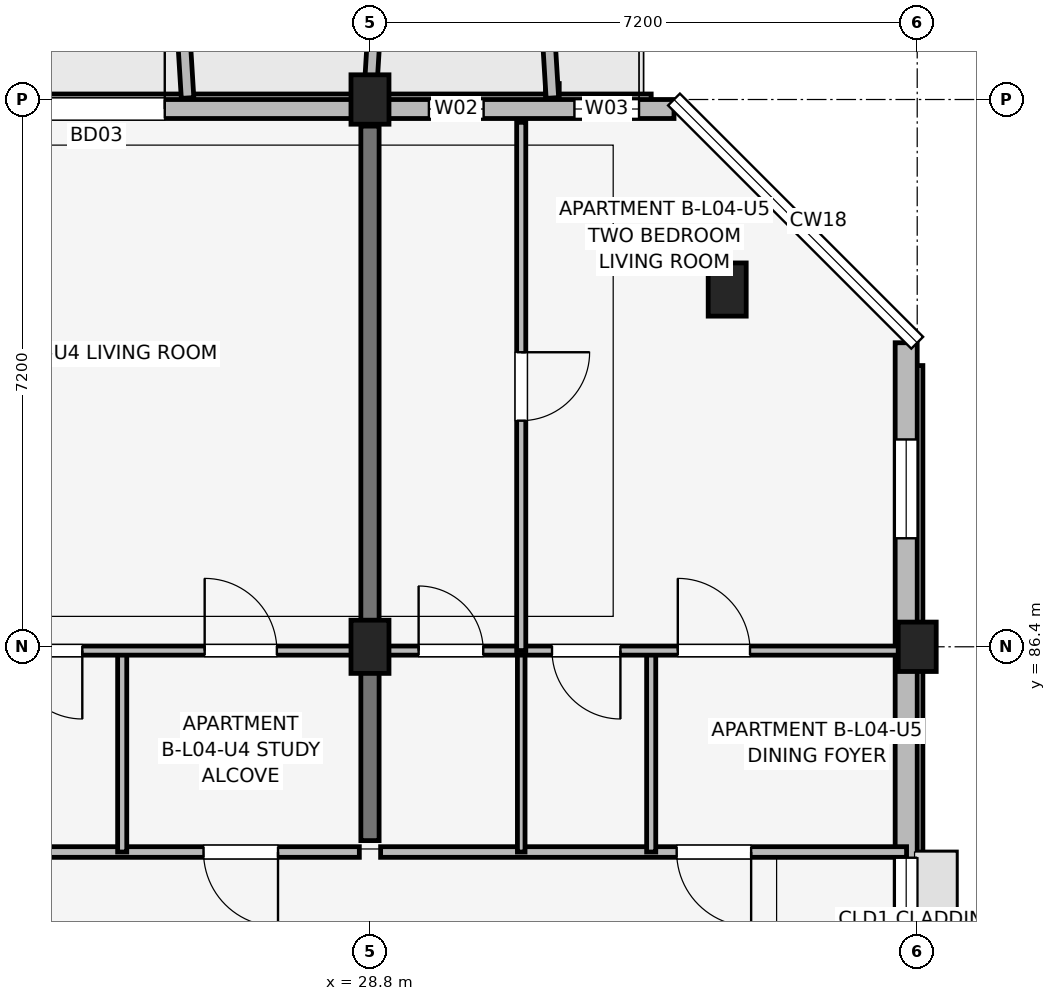
"""IFC4 building model, lengths in metres.
Left out: names, types, materials, properties, quantities, classifications, styles, units other than length and angle.
Written with IfcOpenShell. Run it as: python <this file> out.ifc"""

import sys

from ifc_helpers import new_model, si_unit, direction, frame, frame_2d, origin, origin_2d, place, context, subcontext, project, spatial, rectangle, extrude, element, fill, save


model = new_model("IFC4")
c1 = context("Model", 3, precision=1e-05, world=origin(), true_north=direction((0.0, 1.0)))
c2 = subcontext(c1, "Body", "Model", "MODEL_VIEW")
j1 = project(units=[si_unit("LENGTHUNIT", "METRE"), si_unit("PLANEANGLEUNIT", "RADIAN")], contexts=[c1])
p1 = place(None, origin())
s1 = spatial("IfcSite", under=j1, at=p1, CompositionType="ELEMENT")
p2 = place(p1, origin())
s2 = spatial("IfcBuilding", under=s1, at=p2, CompositionType="ELEMENT")
p3 = place(p2, frame((0.0, 0.0, 15.0)))
s3 = spatial("IfcBuildingStorey", under=s2, at=p3, CompositionType="ELEMENT", Elevation=15.0)
p4 = place(p3, frame((28.8, 86.4, 0.0), z_axis=(0.0, 0.0, 1.0), x_axis=(1.0, 0.0, 0.0)))
e1 = element("IfcColumn", 1, at=p4, inside=s3, PredefinedType="COLUMN", context=c2, shape_type="SweptSolid", body=[
    extrude(rectangle(XDim=0.5, YDim=0.7, at=origin_2d()), origin(), (0.0, 0.0, 1.0), 3.15),
])
for number, where, z_axis, x_axis in (
    (2, (28.8, 93.6, 0.0), (0.0, 0.0, 1.0), (1.0, 0.0, 0.0)),
    (3, (36.0, 86.4, 0.0), (0.0, 0.0, 1.0), (1.0, 0.0, 0.0)),
):
    element("IfcColumn", number, at=place(p3, frame(where, z_axis=z_axis, x_axis=x_axis)), inside=s3, PredefinedType="COLUMN", context=c2, shape_type="SweptSolid", body=[
        extrude(rectangle(XDim=0.5, YDim=0.65, at=origin_2d()), origin(), (0.0, 0.0, 1.0), 3.15),
    ])
p5 = place(p3, frame((33.5, 91.1, 0.0), z_axis=(0.0, 0.0, 1.0), x_axis=(1.0, 0.0, 0.0)))
e4 = element("IfcColumn", 4, at=p5, inside=s3, PredefinedType="COLUMN", context=c2, shape_type="SweptSolid", body=[
    extrude(rectangle(XDim=0.5, YDim=0.7, at=origin_2d()), origin(), (0.0, 0.0, 1.0), 3.15),
])
p6 = place(p3, frame((28.8, 83.85, 0.0), z_axis=(0.0, 0.0, 1.0), x_axis=(0.0, 1.0, 0.0)))
e5 = element("IfcWall", 5, at=p6, inside=s3, PredefinedType="SHEAR", context=c2, shape_type="SweptSolid", body=[
    extrude(rectangle(XDim=9.4, YDim=0.24, at=frame_2d((4.7, 0.0))), origin(), (0.0, 0.0, 1.0), 3.15),
])
p7 = place(p3, frame((35.855, 75.2, 0.0), z_axis=(0.0, 0.0, 1.0), x_axis=(0.0, 1.0, 0.0)))
e6 = element("IfcWall", 6, at=p7, inside=s3, PredefinedType="SOLIDWALL", context=c2, shape_type="SweptSolid", body=[
    extrude(rectangle(XDim=15.2, YDim=0.29, at=frame_2d((7.6, 0.0))), origin(), (0.0, 0.0, 1.0), 2.38),
])
p8 = place(p7, frame((6.775, 0.0, 1.05)))
e7 = element("IfcOpeningElement", 7, at=p8, cuts=e6, PredefinedType="OPENING", context=c2, shape_type="SweptSolid", body=[
    extrude(rectangle(XDim=1.65, YDim=1.15, at=frame_2d((0.825, 0.575))), frame((0.0, 0.155, 0.0), z_axis=(0.0, -1.0, 0.0), x_axis=(1.0, 0.0, 0.0)), (0.0, 0.0, 1.0), 0.31),
])
p9 = place(p7, frame((12.627, 0.0, 0.72)))
e8 = element("IfcOpeningElement", 8, at=p9, cuts=e6, PredefinedType="OPENING", context=c2, shape_type="SweptSolid", body=[
    extrude(rectangle(XDim=1.3, YDim=1.55, at=frame_2d((0.65, 0.775))), frame((0.0, 0.155, 0.0), z_axis=(0.0, -1.0, 0.0), x_axis=(1.0, 0.0, 0.0)), (0.0, 0.0, 1.0), 0.31),
])
p10 = place(p3, frame((32.8, 93.475, 0.0), z_axis=(0.0, 0.0, 1.0), x_axis=(-1.0, 0.0, 0.0)))
e9 = element("IfcWall", 9, at=p10, inside=s3, PredefinedType="SOLIDWALL", context=c2, shape_type="SweptSolid", body=[
    extrude(rectangle(XDim=29.6, YDim=0.25, at=frame_2d((14.8, 0.0))), origin(), (0.0, 0.0, 1.0), 2.43),
])
p11 = place(p10, frame((22.75, 0.0, 0.0), z_axis=(0.0, 0.0, 1.0), x_axis=(-1.0, 0.0, 0.0)))
e10 = element("IfcOpeningElement", 10, at=p11, cuts=e9, PredefinedType="OPENING", context=c2, shape_type="SweptSolid", body=[
    extrude(rectangle(XDim=1.5, YDim=2.15, at=frame_2d((0.75, 1.075))), frame((0.0, 0.135, 0.0), z_axis=(0.0, -1.0, 0.0), x_axis=(1.0, 0.0, 0.0)), (0.0, 0.0, 1.0), 0.27),
])
p12 = place(p10, frame((8.5, 0.0, 0.0), z_axis=(0.0, 0.0, 1.0), x_axis=(-1.0, 0.0, 0.0)))
e11 = element("IfcOpeningElement", 11, at=p12, cuts=e9, PredefinedType="OPENING", context=c2, shape_type="SweptSolid", body=[
    extrude(rectangle(XDim=1.8, YDim=2.15, at=frame_2d((0.9, 1.075))), frame((0.0, 0.135, 0.0), z_axis=(0.0, -1.0, 0.0), x_axis=(1.0, 0.0, 0.0)), (0.0, 0.0, 1.0), 0.27),
])
p13 = place(p10, frame((26.015, 0.0, 0.7)))
e12 = element("IfcOpeningElement", 12, at=p13, cuts=e9, PredefinedType="OPENING", context=c2, shape_type="SweptSolid", body=[
    extrude(rectangle(XDim=1.86, YDim=1.6, at=frame_2d((0.93, 0.8))), frame((0.0, 0.135, 0.0), z_axis=(0.0, -1.0, 0.0), x_axis=(1.0, 0.0, 0.0)), (0.0, 0.0, 1.0), 0.27),
])
p14 = place(p10, frame((23.61, 0.0, 0.75)))
e13 = element("IfcOpeningElement", 13, at=p14, cuts=e9, PredefinedType="OPENING", context=c2, shape_type="SweptSolid", body=[
    extrude(rectangle(XDim=1.46, YDim=1.55, at=frame_2d((0.73, 0.775))), frame((0.0, 0.135, 0.0), z_axis=(0.0, -1.0, 0.0), x_axis=(1.0, 0.0, 0.0)), (0.0, 0.0, 1.0), 0.27),
])
p15 = place(p10, frame((13.94, 0.0, 0.7)))
e14 = element("IfcOpeningElement", 14, at=p15, cuts=e9, PredefinedType="OPENING", context=c2, shape_type="SweptSolid", body=[
    extrude(rectangle(XDim=1.72, YDim=1.6, at=frame_2d((0.86, 0.8))), frame((0.0, 0.135, 0.0), z_axis=(0.0, -1.0, 0.0), x_axis=(1.0, 0.0, 0.0)), (0.0, 0.0, 1.0), 0.27),
])
p16 = place(p10, frame((2.505, 0.0, 0.75)))
e15 = element("IfcOpeningElement", 15, at=p16, cuts=e9, PredefinedType="OPENING", context=c2, shape_type="SweptSolid", body=[
    extrude(rectangle(XDim=0.72, YDim=1.35, at=frame_2d((0.36, 0.675))), frame((0.0, 0.135, 0.0), z_axis=(0.0, -1.0, 0.0), x_axis=(1.0, 0.0, 0.0)), (0.0, 0.0, 1.0), 0.27),
])
p17 = place(p10, frame((0.46, 0.0, 0.75)))
e16 = element("IfcOpeningElement", 16, at=p17, cuts=e9, PredefinedType="OPENING", context=c2, shape_type="SweptSolid", body=[
    extrude(rectangle(XDim=0.85, YDim=1.4, at=frame_2d((0.425, 0.7))), frame((0.0, 0.135, 0.0), z_axis=(0.0, -1.0, 0.0), x_axis=(1.0, 0.0, 0.0)), (0.0, 0.0, 1.0), 0.27),
])
p18 = place(p3, frame((26.4, 93.62, 0.0), z_axis=(0.0, 0.0, 1.0), x_axis=(-0.061046865508, 0.998134900808, 0.0)))
e17 = element("IfcWall", 17, at=p18, inside=s3, PredefinedType="ELEMENTEDWALL", context=c2, shape_type="SweptSolid", body=[
    extrude(rectangle(XDim=1.964, YDim=0.165, at=frame_2d((0.982, 0.0))), origin(), (0.0, 0.0, 1.0), 2.48),
])
for number, where, z_axis, x_axis in (
    (18, (28.8, 93.62, 0.0), (0.0, 0.0, 1.0), (0.061, 0.998, 0.0)),
    (19, (31.2, 93.62, 0.0), (0.0, 0.0, 1.0), (-0.061, 0.998, 0.0)),
):
    element("IfcWall", number, at=place(p3, frame(where, z_axis=z_axis, x_axis=x_axis)), inside=s3, PredefinedType="ELEMENTEDWALL", context=c2, shape_type="SweptSolid", body=[
        extrude(rectangle(XDim=1.964, YDim=0.165, at=frame_2d((0.982, 0.0))), origin(), (0.0, 0.0, 1.0), 2.95),
    ])
p19 = place(p3, frame((21.74, 83.7, 0.0), z_axis=(0.0, 0.0, 1.0), x_axis=(1.0, 0.0, 0.0)))
e20 = element("IfcWall", 20, at=p19, inside=s3, PredefinedType="PARTITIONING", context=c2, shape_type="SweptSolid", body=[
    extrude(rectangle(XDim=6.92, YDim=0.14, at=frame_2d((3.46, 0.0))), origin(), (0.0, 0.0, 1.0), 2.38),
])
p20 = place(p19, frame((5.85, 0.0, 0.0), z_axis=(0.0, 0.0, 1.0), x_axis=(-1.0, 0.0, 0.0)))
e21 = element("IfcOpeningElement", 21, at=p20, cuts=e20, PredefinedType="OPENING", context=c2, shape_type="SweptSolid", body=[
    extrude(rectangle(XDim=0.98, YDim=2.1, at=frame_2d((0.49, 1.05))), frame((0.0, 0.08, 0.0), z_axis=(0.0, -1.0, 0.0), x_axis=(1.0, 0.0, 0.0)), (0.0, 0.0, 1.0), 0.16),
])
p21 = place(p3, frame((25.54, 83.7, 0.0), z_axis=(0.0, 0.0, 1.0), x_axis=(0.0, 1.0, 0.0)))
e22 = element("IfcWall", 22, at=p21, inside=s3, PredefinedType="PARTITIONING", context=c2, shape_type="SweptSolid", body=[
    extrude(rectangle(XDim=2.65, YDim=0.12, at=frame_2d((1.325, 0.0))), origin(), (0.0, 0.0, 1.0), 2.375),
])
p22 = place(p3, frame((21.74, 86.35, 0.0), z_axis=(0.0, 0.0, 1.0), x_axis=(1.0, 0.0, 0.0)))
e23 = element("IfcWall", 23, at=p22, inside=s3, PredefinedType="PARTITIONING", context=c2, shape_type="SweptSolid", body=[
    extrude(rectangle(XDim=6.92, YDim=0.12, at=frame_2d((3.46, 0.0))), origin(), (0.0, 0.0, 1.0), 2.375),
])
p23 = place(p22, frame((0.5, 0.0, 0.0)))
e24 = element("IfcOpeningElement", 24, at=p23, cuts=e23, PredefinedType="OPENING", context=c2, shape_type="SweptSolid", body=[
    extrude(rectangle(XDim=0.85, YDim=2.08, at=frame_2d((0.425, 1.04))), frame((0.0, 0.07, 0.0), z_axis=(0.0, -1.0, 0.0), x_axis=(1.0, 0.0, 0.0)), (0.0, 0.0, 1.0), 0.14),
])
p24 = place(p22, frame((3.275, 0.0, 0.0), z_axis=(0.0, 0.0, 1.0), x_axis=(-1.0, 0.0, 0.0)))
e25 = element("IfcOpeningElement", 25, at=p24, cuts=e23, PredefinedType="OPENING", context=c2, shape_type="SweptSolid", body=[
    extrude(rectangle(XDim=0.9, YDim=2.08, at=frame_2d((0.45, 1.04))), frame((0.0, 0.07, 0.0), z_axis=(0.0, -1.0, 0.0), x_axis=(1.0, 0.0, 0.0)), (0.0, 0.0, 1.0), 0.14),
])
p25 = place(p22, frame((4.885, 0.0, 0.0)))
e26 = element("IfcOpeningElement", 26, at=p25, cuts=e23, PredefinedType="OPENING", context=c2, shape_type="SweptSolid", body=[
    extrude(rectangle(XDim=0.95, YDim=2.08, at=frame_2d((0.475, 1.04))), frame((0.0, 0.07, 0.0), z_axis=(0.0, -1.0, 0.0), x_axis=(1.0, 0.0, 0.0)), (0.0, 0.0, 1.0), 0.14),
])
p26 = place(p3, frame((28.94, 83.7, 0.0), z_axis=(0.0, 0.0, 1.0), x_axis=(1.0, 0.0, 0.0)))
e27 = element("IfcWall", 27, at=p26, inside=s3, PredefinedType="PARTITIONING", context=c2, shape_type="SweptSolid", body=[
    extrude(rectangle(XDim=6.92, YDim=0.14, at=frame_2d((3.46, 0.0))), origin(), (0.0, 0.0, 1.0), 2.38),
])
p27 = place(p26, frame((4.875, 0.0, 0.0), z_axis=(0.0, 0.0, 1.0), x_axis=(-1.0, 0.0, 0.0)))
e28 = element("IfcOpeningElement", 28, at=p27, cuts=e27, PredefinedType="OPENING", context=c2, shape_type="SweptSolid", body=[
    extrude(rectangle(XDim=0.98, YDim=2.1, at=frame_2d((0.49, 1.05))), frame((0.0, 0.08, 0.0), z_axis=(0.0, -1.0, 0.0), x_axis=(1.0, 0.0, 0.0)), (0.0, 0.0, 1.0), 0.16),
])
p28 = place(p3, frame((30.79, 83.7, 0.0), z_axis=(0.0, 0.0, 1.0), x_axis=(0.0, 1.0, 0.0)))
e29 = element("IfcWall", 29, at=p28, inside=s3, PredefinedType="PARTITIONING", context=c2, shape_type="SweptSolid", body=[
    extrude(rectangle(XDim=2.65, YDim=0.1, at=frame_2d((1.325, 0.0))), origin(), (0.0, 0.0, 1.0), 2.375),
])
p29 = place(p3, frame((32.5, 83.7, 0.0), z_axis=(0.0, 0.0, 1.0), x_axis=(0.0, 1.0, 0.0)))
e30 = element("IfcWall", 30, at=p29, inside=s3, PredefinedType="PARTITIONING", context=c2, shape_type="SweptSolid", body=[
    extrude(rectangle(XDim=2.65, YDim=0.12, at=frame_2d((1.325, 0.0))), origin(), (0.0, 0.0, 1.0), 2.375),
])
p30 = place(p3, frame((28.94, 86.35, 0.0), z_axis=(0.0, 0.0, 1.0), x_axis=(1.0, 0.0, 0.0)))
e31 = element("IfcWall", 31, at=p30, inside=s3, PredefinedType="PARTITIONING", context=c2, shape_type="SweptSolid", body=[
    extrude(rectangle(XDim=6.92, YDim=0.12, at=frame_2d((3.46, 0.0))), origin(), (0.0, 0.0, 1.0), 2.375),
])
p31 = place(p30, frame((0.5, 0.0, 0.0)))
e32 = element("IfcOpeningElement", 32, at=p31, cuts=e31, PredefinedType="OPENING", context=c2, shape_type="SweptSolid", body=[
    extrude(rectangle(XDim=0.85, YDim=2.08, at=frame_2d((0.425, 1.04))), frame((0.0, 0.07, 0.0), z_axis=(0.0, -1.0, 0.0), x_axis=(1.0, 0.0, 0.0)), (0.0, 0.0, 1.0), 0.14),
])
p32 = place(p30, frame((3.155, 0.0, 0.0), z_axis=(0.0, 0.0, 1.0), x_axis=(-1.0, 0.0, 0.0)))
e33 = element("IfcOpeningElement", 33, at=p32, cuts=e31, PredefinedType="OPENING", context=c2, shape_type="SweptSolid", body=[
    extrude(rectangle(XDim=0.9, YDim=2.08, at=frame_2d((0.45, 1.04))), frame((0.0, 0.07, 0.0), z_axis=(0.0, -1.0, 0.0), x_axis=(1.0, 0.0, 0.0)), (0.0, 0.0, 1.0), 0.14),
])
p33 = place(p30, frame((3.91, 0.0, 0.0)))
e34 = element("IfcOpeningElement", 34, at=p33, cuts=e31, PredefinedType="OPENING", context=c2, shape_type="SweptSolid", body=[
    extrude(rectangle(XDim=0.95, YDim=2.08, at=frame_2d((0.475, 1.04))), frame((0.0, 0.07, 0.0), z_axis=(0.0, -1.0, 0.0), x_axis=(1.0, 0.0, 0.0)), (0.0, 0.0, 1.0), 0.14),
])
p34 = place(p3, frame((30.79, 86.35, 0.0), z_axis=(0.0, 0.0, 1.0), x_axis=(0.0, 1.0, 0.0)))
e35 = element("IfcWall", 35, at=p34, inside=s3, PredefinedType="PARTITIONING", context=c2, shape_type="SweptSolid", body=[
    extrude(rectangle(XDim=6.95, YDim=0.12, at=frame_2d((3.475, 0.0))), origin(), (0.0, 0.0, 1.0), 2.375),
])
p35 = place(p34, frame((3.925, 0.0, 0.0), z_axis=(0.0, 0.0, 1.0), x_axis=(-1.0, 0.0, 0.0)))
e36 = element("IfcOpeningElement", 36, at=p35, cuts=e35, PredefinedType="OPENING", context=c2, shape_type="SweptSolid", body=[
    extrude(rectangle(XDim=0.9, YDim=2.08, at=frame_2d((0.45, 1.04))), frame((0.0, 0.07, 0.0), z_axis=(0.0, -1.0, 0.0), x_axis=(1.0, 0.0, 0.0)), (0.0, 0.0, 1.0), 0.14),
])
p36 = place(p12, origin())
e37 = element("IfcDoor", 37, at=p36, inside=s3, OperationType="SINGLE_SWING_LEFT", PredefinedType="DOOR", context=c2, shape_type="SweptSolid", body=[
    extrude(rectangle(XDim=1.8, YDim=2.15, at=frame_2d((0.9, 1.075))), frame((0.0, 0.025, 0.0), z_axis=(0.0, -1.0, 0.0), x_axis=(1.0, 0.0, 0.0)), (0.0, 0.0, 1.0), 0.05),
])
fill(e11, e37)
p37 = place(p16, origin())
e38 = element("IfcWindow", 38, at=p37, inside=s3, PartitioningType="SINGLE_PANEL", PredefinedType="WINDOW", context=c2, shape_type="SweptSolid", body=[
    extrude(rectangle(XDim=0.72, YDim=1.35, at=frame_2d((0.36, 0.675))), frame((0.0, 0.03, 0.0), z_axis=(0.0, -1.0, 0.0), x_axis=(1.0, 0.0, 0.0)), (0.0, 0.0, 1.0), 0.06),
])
fill(e15, e38)
p38 = place(p17, origin())
e39 = element("IfcWindow", 39, at=p38, inside=s3, PartitioningType="SINGLE_PANEL", PredefinedType="WINDOW", context=c2, shape_type="SweptSolid", body=[
    extrude(rectangle(XDim=0.85, YDim=1.4, at=frame_2d((0.425, 0.7))), frame((0.0, 0.03, 0.0), z_axis=(0.0, -1.0, 0.0), x_axis=(1.0, 0.0, 0.0)), (0.0, 0.0, 1.0), 0.06),
])
fill(e16, e39)
p39 = place(p8, origin())
e40 = element("IfcWindow", 40, at=p39, inside=s3, PartitioningType="SINGLE_PANEL", PredefinedType="WINDOW", context=c2, shape_type="SweptSolid", body=[
    extrude(rectangle(XDim=1.65, YDim=1.15, at=frame_2d((0.825, 0.575))), frame((0.0, 0.03, 0.0), z_axis=(0.0, -1.0, 0.0), x_axis=(1.0, 0.0, 0.0)), (0.0, 0.0, 1.0), 0.06),
])
fill(e7, e40)
p40 = place(p9, origin())
e41 = element("IfcWindow", 41, at=p40, inside=s3, PartitioningType="SINGLE_PANEL", PredefinedType="WINDOW", context=c2, shape_type="SweptSolid", body=[
    extrude(rectangle(XDim=1.3, YDim=1.55, at=frame_2d((0.65, 0.775))), frame((0.0, 0.03, 0.0), z_axis=(0.0, -1.0, 0.0), x_axis=(1.0, 0.0, 0.0)), (0.0, 0.0, 1.0), 0.06),
])
fill(e8, e41)
p41 = place(p20, origin())
e42 = element("IfcDoor", 42, at=p41, inside=s3, OperationType="SINGLE_SWING_RIGHT", PredefinedType="DOOR", context=c2, shape_type="SweptSolid", body=[
    extrude(rectangle(XDim=0.98, YDim=2.1, at=frame_2d((0.49, 1.05))), frame((0.0, 0.025, 0.0), z_axis=(0.0, -1.0, 0.0), x_axis=(1.0, 0.0, 0.0)), (0.0, 0.0, 1.0), 0.05),
])
fill(e21, e42)
p42 = place(p24, origin())
e43 = element("IfcDoor", 43, at=p42, inside=s3, OperationType="SINGLE_SWING_RIGHT", PredefinedType="DOOR", context=c2, shape_type="SweptSolid", body=[
    extrude(rectangle(XDim=0.9, YDim=2.08, at=frame_2d((0.45, 1.04))), frame((0.0, 0.025, 0.0), z_axis=(0.0, -1.0, 0.0), x_axis=(1.0, 0.0, 0.0)), (0.0, 0.0, 1.0), 0.05),
])
fill(e25, e43)
p43 = place(p25, origin())
e44 = element("IfcDoor", 44, at=p43, inside=s3, OperationType="SINGLE_SWING_LEFT", PredefinedType="DOOR", context=c2, shape_type="SweptSolid", body=[
    extrude(rectangle(XDim=0.95, YDim=2.08, at=frame_2d((0.475, 1.04))), frame((0.0, 0.025, 0.0), z_axis=(0.0, -1.0, 0.0), x_axis=(1.0, 0.0, 0.0)), (0.0, 0.0, 1.0), 0.05),
])
fill(e26, e44)
p44 = place(p27, origin())
e45 = element("IfcDoor", 45, at=p44, inside=s3, OperationType="SINGLE_SWING_RIGHT", PredefinedType="DOOR", context=c2, shape_type="SweptSolid", body=[
    extrude(rectangle(XDim=0.98, YDim=2.1, at=frame_2d((0.49, 1.05))), frame((0.0, 0.025, 0.0), z_axis=(0.0, -1.0, 0.0), x_axis=(1.0, 0.0, 0.0)), (0.0, 0.0, 1.0), 0.05),
])
fill(e28, e45)
p45 = place(p31, origin())
e46 = element("IfcDoor", 46, at=p45, inside=s3, OperationType="SINGLE_SWING_LEFT", PredefinedType="DOOR", context=c2, shape_type="SweptSolid", body=[
    extrude(rectangle(XDim=0.85, YDim=2.08, at=frame_2d((0.425, 1.04))), frame((0.0, 0.025, 0.0), z_axis=(0.0, -1.0, 0.0), x_axis=(1.0, 0.0, 0.0)), (0.0, 0.0, 1.0), 0.05),
])
fill(e32, e46)
p46 = place(p32, origin())
e47 = element("IfcDoor", 47, at=p46, inside=s3, OperationType="SINGLE_SWING_RIGHT", PredefinedType="DOOR", context=c2, shape_type="SweptSolid", body=[
    extrude(rectangle(XDim=0.9, YDim=2.08, at=frame_2d((0.45, 1.04))), frame((0.0, 0.025, 0.0), z_axis=(0.0, -1.0, 0.0), x_axis=(1.0, 0.0, 0.0)), (0.0, 0.0, 1.0), 0.05),
])
fill(e33, e47)
p47 = place(p33, origin())
e48 = element("IfcDoor", 48, at=p47, inside=s3, OperationType="SINGLE_SWING_LEFT", PredefinedType="DOOR", context=c2, shape_type="SweptSolid", body=[
    extrude(rectangle(XDim=0.95, YDim=2.08, at=frame_2d((0.475, 1.04))), frame((0.0, 0.025, 0.0), z_axis=(0.0, -1.0, 0.0), x_axis=(1.0, 0.0, 0.0)), (0.0, 0.0, 1.0), 0.05),
])
fill(e34, e48)
p48 = place(p35, origin())
e49 = element("IfcDoor", 49, at=p48, inside=s3, OperationType="SINGLE_SWING_RIGHT", PredefinedType="DOOR", context=c2, shape_type="SweptSolid", body=[
    extrude(rectangle(XDim=0.9, YDim=2.08, at=frame_2d((0.45, 1.04))), frame((0.0, 0.025, 0.0), z_axis=(0.0, -1.0, 0.0), x_axis=(1.0, 0.0, 0.0)), (0.0, 0.0, 1.0), 0.05),
])
fill(e36, e49)
save(model, sys.argv[1])
